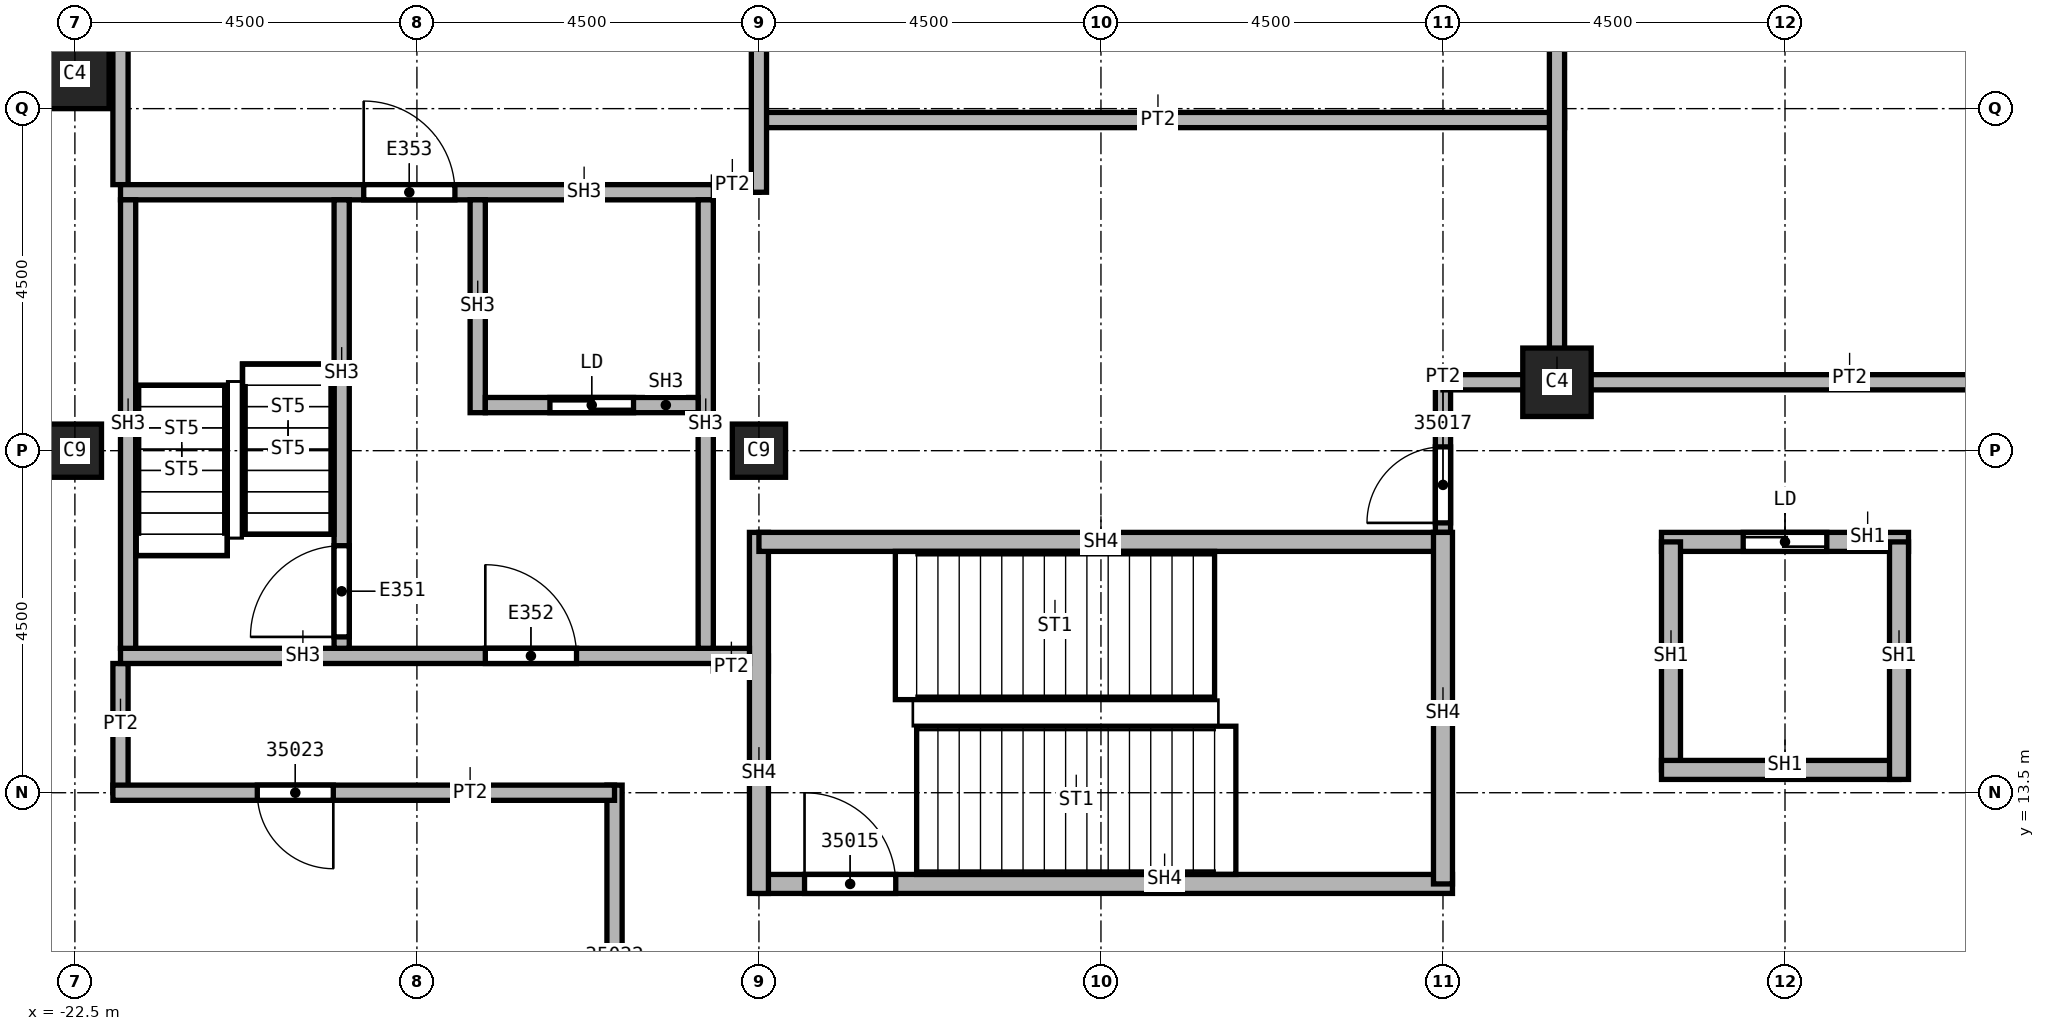
"""IFC4 building model, lengths in metres.
Left out: names, types, materials, properties, quantities, classifications, styles, units other than length and angle.
Written with IfcOpenShell. Run it as: python <this file> out.ifc"""

import sys

from ifc_helpers import new_model, si_unit, direction, frame, frame_2d, origin, origin_2d, place, context, subcontext, project, spatial, rectangle, extrude, element, fill, save


model = new_model("IFC4")
c1 = context("Model", 3, precision=1e-05, world=origin(), true_north=direction((0.0, 1.0)))
c2 = subcontext(c1, "Body", "Model", "MODEL_VIEW")
j1 = project(units=[si_unit("LENGTHUNIT", "METRE"), si_unit("PLANEANGLEUNIT", "RADIAN")], contexts=[c1])
p1 = place(None, origin())
s1 = spatial("IfcSite", under=j1, at=p1, CompositionType="ELEMENT")
p2 = place(p1, origin())
s2 = spatial("IfcBuilding", under=s1, at=p2, CompositionType="ELEMENT")
p3 = place(p2, frame((0.0, 0.0, 376.0)))
s3 = spatial("IfcBuildingStorey", under=s2, at=p3, CompositionType="ELEMENT", Elevation=376.0)
for number, where, z_axis, x_axis in (
    (1, (-13.5, 18.0, 0.0), (0.0, 0.0, 1.0), (1.0, 0.0, 0.0)),
    (2, (-22.5, 18.0, 0.0), (0.0, 0.0, 1.0), (1.0, 0.0, 0.0)),
):
    element("IfcColumn", number, at=place(p3, frame(where, z_axis=z_axis, x_axis=x_axis)), inside=s3, PredefinedType="COLUMN", context=c2, shape_type="SweptSolid", body=[
        extrude(rectangle(XDim=0.7, YDim=0.7, at=origin_2d()), origin(), (0.0, 0.0, 1.0), 4.6),
    ])
for number, where, z_axis, x_axis in (
    (3, (-3.0, 18.9, 0.0), (0.0, 0.0, 1.0), (1.0, 0.0, 0.0)),
    (4, (-22.5, 22.95, 0.0), (0.0, 0.0, 1.0), (1.0, 0.0, 0.0)),
):
    element("IfcColumn", number, at=place(p3, frame(where, z_axis=z_axis, x_axis=x_axis)), inside=s3, PredefinedType="COLUMN", context=c2, shape_type="SweptSolid", body=[
        extrude(rectangle(XDim=0.9, YDim=0.9, at=origin_2d()), origin(), (0.0, 0.0, 1.0), 4.6),
    ])
p4 = place(p3, frame((-21.9, 13.5, 0.0), z_axis=(0.0, 0.0, 1.0), x_axis=(0.0, 1.0, 0.0)))
e5 = element("IfcWall", 5, at=p4, inside=s3, PredefinedType="PARTITIONING", context=c2, shape_type="SweptSolid", body=[
    extrude(rectangle(XDim=1.7, YDim=0.2, at=frame_2d((0.85, 0.0))), origin(), (0.0, 0.0, 1.0), 4.15),
])
p5 = place(p3, frame((-21.9, 21.5, 0.0), z_axis=(0.0, 0.0, 1.0), x_axis=(0.0, 1.0, 0.0)))
e6 = element("IfcWall", 6, at=p5, inside=s3, PredefinedType="PARTITIONING", context=c2, shape_type="SweptSolid", body=[
    extrude(rectangle(XDim=6.136, YDim=0.2, at=frame_2d((3.068, 0.0))), origin(), (0.0, 0.0, 1.0), 4.15),
])
p6 = place(p3, frame((-15.4, -8.55, 0.0), z_axis=(0.0, 0.0, 1.0), x_axis=(0.0, 1.0, 0.0)))
e7 = element("IfcWall", 7, at=p6, inside=s3, PredefinedType="PARTITIONING", context=c2, shape_type="SweptSolid", body=[
    extrude(rectangle(XDim=22.15, YDim=0.2, at=frame_2d((11.075, 0.0))), origin(), (0.0, 0.0, 1.0), 4.15),
])
p7 = place(p6, frame((8.7, 0.0, 0.0)))
e8 = element("IfcOpeningElement", 8, at=p7, cuts=e7, PredefinedType="OPENING", context=c2, shape_type="SweptSolid", body=[
    extrude(rectangle(XDim=1.0, YDim=2.1, at=frame_2d((0.5, 1.05))), frame((0.0, 0.1, 0.0), z_axis=(0.0, -1.0, 0.0), x_axis=(1.0, 0.0, 0.0)), (0.0, 0.0, 1.0), 0.2),
])
p8 = place(p6, frame((14.025, 0.0, 0.0)))
e9 = element("IfcOpeningElement", 9, at=p8, cuts=e7, PredefinedType="OPENING", context=c2, shape_type="SweptSolid", body=[
    extrude(rectangle(XDim=1.0, YDim=2.1, at=frame_2d((0.5, 1.05))), frame((0.0, 0.1, 0.0), z_axis=(0.0, -1.0, 0.0), x_axis=(1.0, 0.0, 0.0)), (0.0, 0.0, 1.0), 0.2),
])
p9 = place(p6, frame((18.6, 0.0, 0.0)))
e10 = element("IfcOpeningElement", 10, at=p9, cuts=e7, PredefinedType="OPENING", context=c2, shape_type="SweptSolid", body=[
    extrude(rectangle(XDim=1.0, YDim=2.1, at=frame_2d((0.5, 1.05))), frame((0.0, 0.1, 0.0), z_axis=(0.0, -1.0, 0.0), x_axis=(1.0, 0.0, 0.0)), (0.0, 0.0, 1.0), 0.2),
])
p10 = place(p6, frame((1.6, 0.0, 0.0)))
e11 = element("IfcOpeningElement", 11, at=p10, cuts=e7, PredefinedType="OPENING", context=c2, shape_type="SweptSolid", body=[
    extrude(rectangle(XDim=1.0, YDim=2.1, at=frame_2d((0.5, 1.05))), frame((0.0, 0.1, 0.0), z_axis=(0.0, -1.0, 0.0), x_axis=(1.0, 0.0, 0.0)), (0.0, 0.0, 1.0), 0.2),
])
p11 = place(p6, frame((4.95, 0.0, 0.0)))
e12 = element("IfcOpeningElement", 12, at=p11, cuts=e7, PredefinedType="OPENING", context=c2, shape_type="SweptSolid", body=[
    extrude(rectangle(XDim=1.0, YDim=2.1, at=frame_2d((0.5, 1.05))), frame((0.0, 0.1, 0.0), z_axis=(0.0, -1.0, 0.0), x_axis=(1.0, 0.0, 0.0)), (0.0, 0.0, 1.0), 0.2),
])
p12 = place(p3, frame((-15.4, 13.5, 0.0), z_axis=(0.0, 0.0, 1.0), x_axis=(-1.0, 0.0, 0.0)))
e13 = element("IfcWall", 13, at=p12, inside=s3, PredefinedType="PARTITIONING", context=c2, shape_type="SweptSolid", body=[
    extrude(rectangle(XDim=6.6, YDim=0.2, at=frame_2d((3.3, 0.0))), origin(), (0.0, 0.0, 1.0), 4.15),
])
p13 = place(p12, frame((3.7, 0.0, 0.0)))
e14 = element("IfcOpeningElement", 14, at=p13, cuts=e13, PredefinedType="OPENING", context=c2, shape_type="SweptSolid", body=[
    extrude(rectangle(XDim=1.0, YDim=2.1, at=frame_2d((0.5, 1.05))), frame((0.0, 0.1, 0.0), z_axis=(0.0, -1.0, 0.0), x_axis=(1.0, 0.0, 0.0)), (0.0, 0.0, 1.0), 0.2),
])
p14 = place(p3, frame((-14.1, 15.2, 0.0), z_axis=(0.0, 0.0, 1.0), x_axis=(1.0, 0.0, 0.0)))
e15 = element("IfcWall", 15, at=p14, inside=s3, PredefinedType="PARTITIONING", context=c2, shape_type="SweptSolid", body=[
    extrude(rectangle(XDim=0.725, YDim=0.2, at=frame_2d((0.363, 0.0))), origin(), (0.0, 0.0, 1.0), 4.15),
])
p15 = place(p3, frame((-13.5, 21.5, 0.0), z_axis=(0.0, 0.0, 1.0), x_axis=(-1.0, 0.0, 0.0)))
e16 = element("IfcWall", 16, at=p15, inside=s3, PredefinedType="PARTITIONING", context=c2, shape_type="SweptSolid", body=[
    extrude(rectangle(XDim=0.6, YDim=0.2, at=frame_2d((0.3, 0.0))), origin(), (0.0, 0.0, 1.0), 4.15),
])
p16 = place(p3, frame((-13.5, 22.35, 0.0), z_axis=(0.0, 0.0, 1.0), x_axis=(1.0, 0.0, 0.0)))
e17 = element("IfcWall", 17, at=p16, inside=s3, PredefinedType="PARTITIONING", context=c2, shape_type="SweptSolid", body=[
    extrude(rectangle(XDim=10.6, YDim=0.2, at=frame_2d((5.3, 0.0))), origin(), (0.0, 0.0, 1.0), 4.15),
])
p17 = place(p3, frame((-13.5, 27.45, 0.0), z_axis=(0.0, 0.0, 1.0), x_axis=(0.0, -1.0, 0.0)))
e18 = element("IfcWall", 18, at=p17, inside=s3, PredefinedType="PARTITIONING", context=c2, shape_type="SweptSolid", body=[
    extrude(rectangle(XDim=6.05, YDim=0.2, at=frame_2d((3.025, 0.0))), origin(), (0.0, 0.0, 1.0), 4.15),
])
p18 = place(p17, frame((1.15, 0.0, 0.0)))
e19 = element("IfcOpeningElement", 19, at=p18, cuts=e18, PredefinedType="OPENING", context=c2, shape_type="SweptSolid", body=[
    extrude(rectangle(XDim=1.0, YDim=2.1, at=frame_2d((0.5, 1.05))), frame((0.0, 0.1, 0.0), z_axis=(0.0, -1.0, 0.0), x_axis=(1.0, 0.0, 0.0)), (0.0, 0.0, 1.0), 0.2),
])
p19 = place(p3, frame((-4.5, 16.8, 0.0), z_axis=(0.0, 0.0, 1.0), x_axis=(0.0, 1.0, 0.0)))
e20 = element("IfcWall", 20, at=p19, inside=s3, PredefinedType="PARTITIONING", context=c2, shape_type="SweptSolid", body=[
    extrude(rectangle(XDim=2.2, YDim=0.2, at=frame_2d((1.1, 0.0))), origin(), (0.0, 0.0, 1.0), 4.15),
])
p20 = place(p19, frame((0.25, 0.0, 0.0)))
e21 = element("IfcOpeningElement", 21, at=p20, cuts=e20, PredefinedType="OPENING", context=c2, shape_type="SweptSolid", body=[
    extrude(rectangle(XDim=1.0, YDim=2.1, at=frame_2d((0.5, 1.05))), frame((0.0, 0.1, 0.0), z_axis=(0.0, -1.0, 0.0), x_axis=(1.0, 0.0, 0.0)), (0.0, 0.0, 1.0), 0.2),
])
p21 = place(p3, frame((-4.5, 18.9, 0.0), z_axis=(0.0, 0.0, 1.0), x_axis=(1.0, 0.0, 0.0)))
e22 = element("IfcWall", 22, at=p21, inside=s3, PredefinedType="PARTITIONING", context=c2, shape_type="SweptSolid", body=[
    extrude(rectangle(XDim=9.1, YDim=0.2, at=frame_2d((4.55, 0.0))), origin(), (0.0, 0.0, 1.0), 4.15),
])
p22 = place(p3, frame((-3.0, 27.45, 0.0), z_axis=(0.0, 0.0, 1.0), x_axis=(0.0, -1.0, 0.0)))
e23 = element("IfcWall", 23, at=p22, inside=s3, PredefinedType="PARTITIONING", context=c2, shape_type="SweptSolid", body=[
    extrude(rectangle(XDim=8.55, YDim=0.2, at=frame_2d((4.275, 0.0))), origin(), (0.0, 0.0, 1.0), 4.15),
])
p23 = place(p3, frame((-1.625, 16.8, 0.0), z_axis=(0.0, 0.0, 1.0), x_axis=(1.0, 0.0, 0.0)))
e24 = element("IfcWall", 24, at=p23, inside=s3, PredefinedType="SOLIDWALL", context=c2, shape_type="SweptSolid", body=[
    extrude(rectangle(XDim=3.25, YDim=0.25, at=frame_2d((1.625, 0.0))), origin(), (0.0, 0.0, 1.0), 4.15),
])
p24 = place(p23, frame((1.075, 0.0, 0.0)))
e25 = element("IfcOpeningElement", 25, at=p24, cuts=e24, PredefinedType="OPENING", context=c2, shape_type="SweptSolid", body=[
    extrude(rectangle(XDim=1.1, YDim=2.1, at=frame_2d((0.55, 1.05))), frame((0.0, 0.125, 0.0), z_axis=(0.0, -1.0, 0.0), x_axis=(1.0, 0.0, 0.0)), (0.0, 0.0, 1.0), 0.25),
])
p25 = place(p3, frame((-1.5, 13.8, 0.0), z_axis=(0.0, 0.0, 1.0), x_axis=(0.0, 1.0, 0.0)))
e26 = element("IfcWall", 26, at=p25, inside=s3, PredefinedType="SOLIDWALL", context=c2, shape_type="SweptSolid", body=[
    extrude(rectangle(XDim=3.0, YDim=0.25, at=frame_2d((1.5, 0.0))), origin(), (0.0, 0.0, 1.0), 4.15),
])
for number, where, z_axis, x_axis in (
    (27, (1.5, 13.8, 0.0), (0.0, 0.0, 1.0), (-1.0, 0.0, 0.0)),
    (28, (1.5, 16.8, 0.0), (0.0, 0.0, 1.0), (0.0, -1.0, 0.0)),
):
    element("IfcWall", number, at=place(p3, frame(where, z_axis=z_axis, x_axis=x_axis)), inside=s3, PredefinedType="SOLIDWALL", context=c2, shape_type="SweptSolid", body=[
        extrude(rectangle(XDim=3.125, YDim=0.25, at=frame_2d((1.562, 0.0))), origin(), (0.0, 0.0, 1.0), 4.15),
    ])
p26 = place(p3, frame((-13.5, 12.3, 0.0), z_axis=(0.0, 0.0, 1.0), x_axis=(1.0, 0.0, 0.0)))
e29 = element("IfcWall", 29, at=p26, inside=s3, PredefinedType="SOLIDWALL", context=c2, shape_type="SweptSolid", body=[
    extrude(rectangle(XDim=9.125, YDim=0.25, at=frame_2d((4.562, 0.0))), origin(), (0.0, 0.0, 1.0), 4.15),
])
p27 = place(p26, frame((0.6, 0.0, 0.0)))
e30 = element("IfcOpeningElement", 30, at=p27, cuts=e29, PredefinedType="OPENING", context=c2, shape_type="SweptSolid", body=[
    extrude(rectangle(XDim=1.2, YDim=2.1, at=frame_2d((0.6, 1.05))), frame((0.0, 0.125, 0.0), z_axis=(0.0, -1.0, 0.0), x_axis=(1.0, 0.0, 0.0)), (0.0, 0.0, 1.0), 0.25),
])
p28 = place(p3, frame((-13.5, 12.175, 0.0), z_axis=(0.0, 0.0, 1.0), x_axis=(0.0, 1.0, 0.0)))
e31 = element("IfcWall", 31, at=p28, inside=s3, PredefinedType="SOLIDWALL", context=c2, shape_type="SweptSolid", body=[
    extrude(rectangle(XDim=4.75, YDim=0.25, at=frame_2d((2.375, 0.0))), origin(), (0.0, 0.0, 1.0), 4.15),
])
p29 = place(p3, frame((-13.5, 16.8, 0.0), z_axis=(0.0, 0.0, 1.0), x_axis=(1.0, 0.0, 0.0)))
e32 = element("IfcWall", 32, at=p29, inside=s3, PredefinedType="SOLIDWALL", context=c2, shape_type="SweptSolid", body=[
    extrude(rectangle(XDim=9.1, YDim=0.25, at=frame_2d((4.55, 0.0))), origin(), (0.0, 0.0, 1.0), 4.15),
])
p30 = place(p3, frame((-4.5, 16.925, 0.0), z_axis=(0.0, 0.0, 1.0), x_axis=(0.0, -1.0, 0.0)))
e33 = element("IfcWall", 33, at=p30, inside=s3, PredefinedType="SOLIDWALL", context=c2, shape_type="SweptSolid", body=[
    extrude(rectangle(XDim=4.625, YDim=0.25, at=frame_2d((2.312, 0.0))), origin(), (0.0, 0.0, 1.0), 4.15),
])
p31 = place(p3, frame((-21.9, 15.3, 0.0), z_axis=(0.0, 0.0, 1.0), x_axis=(1.0, 0.0, 0.0)))
e34 = element("IfcWall", 34, at=p31, inside=s3, PredefinedType="SOLIDWALL", context=c2, shape_type="SweptSolid", body=[
    extrude(rectangle(XDim=8.275, YDim=0.2, at=frame_2d((4.137, 0.0))), origin(), (0.0, 0.0, 1.0), 4.15),
])
p32 = place(p31, frame((4.8, 0.0, 0.0)))
e35 = element("IfcOpeningElement", 35, at=p32, cuts=e34, PredefinedType="OPENING", context=c2, shape_type="SweptSolid", body=[
    extrude(rectangle(XDim=1.2, YDim=2.1, at=frame_2d((0.6, 1.05))), frame((0.0, 0.1, 0.0), z_axis=(0.0, -1.0, 0.0), x_axis=(1.0, 0.0, 0.0)), (0.0, 0.0, 1.0), 0.2),
])
p33 = place(p3, frame((-21.9, 21.4, 0.0), z_axis=(0.0, 0.0, 1.0), x_axis=(1.0, 0.0, 0.0)))
e36 = element("IfcWall", 36, at=p33, inside=s3, PredefinedType="SOLIDWALL", context=c2, shape_type="SweptSolid", body=[
    extrude(rectangle(XDim=7.8, YDim=0.2, at=frame_2d((3.9, 0.0))), origin(), (0.0, 0.0, 1.0), 4.15),
])
p34 = place(p33, frame((3.2, 0.0, 0.0)))
e37 = element("IfcOpeningElement", 37, at=p34, cuts=e36, PredefinedType="OPENING", context=c2, shape_type="SweptSolid", body=[
    extrude(rectangle(XDim=1.2, YDim=2.1, at=frame_2d((0.6, 1.05))), frame((0.0, 0.1, 0.0), z_axis=(0.0, -1.0, 0.0), x_axis=(1.0, 0.0, 0.0)), (0.0, 0.0, 1.0), 0.2),
])
for number, where, z_axis, x_axis in (
    (38, (-21.8, 15.4, 0.0), (0.0, 0.0, 1.0), (0.0, 1.0, 0.0)),
    (39, (-14.2, 15.4, 0.0), (0.0, 0.0, 1.0), (0.0, 1.0, 0.0)),
):
    element("IfcWall", number, at=place(p3, frame(where, z_axis=z_axis, x_axis=x_axis)), inside=s3, PredefinedType="SOLIDWALL", context=c2, shape_type="SweptSolid", body=[
        extrude(rectangle(XDim=5.9, YDim=0.2, at=frame_2d((2.95, 0.0))), origin(), (0.0, 0.0, 1.0), 4.15),
    ])
p35 = place(p3, frame((-18.99, 15.4, 0.0), z_axis=(0.0, 0.0, 1.0), x_axis=(0.0, 1.0, 0.0)))
e40 = element("IfcWall", 40, at=p35, inside=s3, PredefinedType="SOLIDWALL", context=c2, shape_type="SweptSolid", body=[
    extrude(rectangle(XDim=5.9, YDim=0.2, at=frame_2d((2.95, 0.0))), origin(), (0.0, 0.0, 1.0), 4.15),
])
p36 = place(p35, frame((0.15, 0.0, 0.0)))
e41 = element("IfcOpeningElement", 41, at=p36, cuts=e40, PredefinedType="OPENING", context=c2, shape_type="SweptSolid", body=[
    extrude(rectangle(XDim=1.2, YDim=2.1, at=frame_2d((0.6, 1.05))), frame((0.0, 0.1, 0.0), z_axis=(0.0, -1.0, 0.0), x_axis=(1.0, 0.0, 0.0)), (0.0, 0.0, 1.0), 0.2),
])
p37 = place(p3, frame((-17.2, 18.5, 0.0), z_axis=(0.0, 0.0, 1.0), x_axis=(0.0, 1.0, 0.0)))
e42 = element("IfcWall", 42, at=p37, inside=s3, PredefinedType="SOLIDWALL", context=c2, shape_type="SweptSolid", body=[
    extrude(rectangle(XDim=2.8, YDim=0.2, at=frame_2d((1.4, 0.0))), origin(), (0.0, 0.0, 1.0), 4.15),
])
p38 = place(p3, frame((-17.1, 18.6, 0.0), z_axis=(0.0, 0.0, 1.0), x_axis=(1.0, 0.0, 0.0)))
e43 = element("IfcWall", 43, at=p38, inside=s3, PredefinedType="SOLIDWALL", context=c2, shape_type="SweptSolid", body=[
    extrude(rectangle(XDim=2.8, YDim=0.2, at=frame_2d((1.4, 0.0))), origin(), (0.0, 0.0, 1.0), 4.15),
])
p39 = place(p38, frame((0.85, 0.0, 0.0)))
e44 = element("IfcOpeningElement", 44, at=p39, cuts=e43, PredefinedType="OPENING", context=c2, shape_type="SweptSolid", body=[
    extrude(rectangle(XDim=1.1, YDim=2.1, at=frame_2d((0.55, 1.05))), frame((0.0, 0.1, 0.0), z_axis=(0.0, -1.0, 0.0), x_axis=(1.0, 0.0, 0.0)), (0.0, 0.0, 1.0), 0.2),
])
p40 = place(p27, origin())
e45 = element("IfcDoor", 45, at=p40, inside=s3, OperationType="SINGLE_SWING_RIGHT", PredefinedType="DOOR", context=c2, shape_type="SweptSolid", body=[
    extrude(rectangle(XDim=1.2, YDim=2.1, at=frame_2d((0.6, 1.05))), frame((0.0, 0.025, 0.0), z_axis=(0.0, -1.0, 0.0), x_axis=(1.0, 0.0, 0.0)), (0.0, 0.0, 1.0), 0.05),
])
fill(e30, e45)
p41 = place(p20, origin())
e46 = element("IfcDoor", 46, at=p41, inside=s3, OperationType="SINGLE_SWING_RIGHT", PredefinedType="DOOR", context=c2, shape_type="SweptSolid", body=[
    extrude(rectangle(XDim=1.0, YDim=2.1, at=frame_2d((0.5, 1.05))), frame((0.0, 0.025, 0.0), z_axis=(0.0, -1.0, 0.0), x_axis=(1.0, 0.0, 0.0)), (0.0, 0.0, 1.0), 0.05),
])
fill(e21, e46)
p42 = place(p13, origin())
e47 = element("IfcDoor", 47, at=p42, inside=s3, OperationType="SINGLE_SWING_RIGHT", PredefinedType="DOOR", context=c2, shape_type="SweptSolid", body=[
    extrude(rectangle(XDim=1.0, YDim=2.1, at=frame_2d((0.5, 1.05))), frame((0.0, 0.025, 0.0), z_axis=(0.0, -1.0, 0.0), x_axis=(1.0, 0.0, 0.0)), (0.0, 0.0, 1.0), 0.05),
])
fill(e14, e47)
p43 = place(p24, origin())
e48 = element("IfcDoor", 48, at=p43, inside=s3, OperationType="SLIDING_TO_LEFT", PredefinedType="DOOR", context=c2, shape_type="SweptSolid", body=[
    extrude(rectangle(XDim=1.1, YDim=2.1, at=frame_2d((0.55, 1.05))), frame((0.0, 0.025, 0.0), z_axis=(0.0, -1.0, 0.0), x_axis=(1.0, 0.0, 0.0)), (0.0, 0.0, 1.0), 0.05),
])
fill(e25, e48)
p44 = place(p36, origin())
e49 = element("IfcDoor", 49, at=p44, inside=s3, OperationType="SINGLE_SWING_LEFT", PredefinedType="DOOR", context=c2, shape_type="SweptSolid", body=[
    extrude(rectangle(XDim=1.2, YDim=2.1, at=frame_2d((0.6, 1.05))), frame((0.0, 0.025, 0.0), z_axis=(0.0, -1.0, 0.0), x_axis=(1.0, 0.0, 0.0)), (0.0, 0.0, 1.0), 0.05),
])
fill(e41, e49)
p45 = place(p39, origin())
e50 = element("IfcDoor", 50, at=p45, inside=s3, OperationType="SLIDING_TO_LEFT", PredefinedType="DOOR", context=c2, shape_type="SweptSolid", body=[
    extrude(rectangle(XDim=1.1, YDim=2.1, at=frame_2d((0.55, 1.05))), frame((0.0, 0.025, 0.0), z_axis=(0.0, -1.0, 0.0), x_axis=(1.0, 0.0, 0.0)), (0.0, 0.0, 1.0), 0.05),
])
fill(e44, e50)
p46 = place(p32, origin())
e51 = element("IfcDoor", 51, at=p46, inside=s3, OperationType="SINGLE_SWING_RIGHT", PredefinedType="DOOR", context=c2, shape_type="SweptSolid", body=[
    extrude(rectangle(XDim=1.2, YDim=2.1, at=frame_2d((0.6, 1.05))), frame((0.0, 0.025, 0.0), z_axis=(0.0, -1.0, 0.0), x_axis=(1.0, 0.0, 0.0)), (0.0, 0.0, 1.0), 0.05),
])
fill(e35, e51)
p47 = place(p34, origin())
e52 = element("IfcDoor", 52, at=p47, inside=s3, OperationType="SINGLE_SWING_LEFT", PredefinedType="DOOR", context=c2, shape_type="SweptSolid", body=[
    extrude(rectangle(XDim=1.2, YDim=2.1, at=frame_2d((0.6, 1.05))), frame((0.0, 0.025, 0.0), z_axis=(0.0, -1.0, 0.0), x_axis=(1.0, 0.0, 0.0)), (0.0, 0.0, 1.0), 0.05),
])
fill(e37, e52)
save(model, sys.argv[1])
